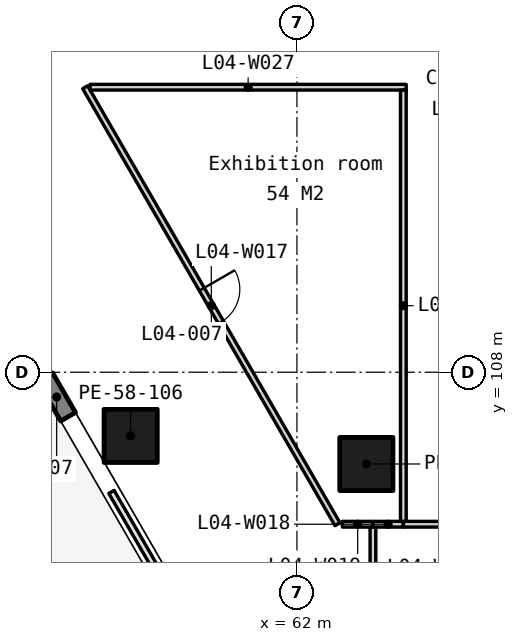
"""IFC4 building model, lengths in metres.
Left out: names, types, materials, properties, quantities, classifications, styles, units other than length and angle.
Written with IfcOpenShell. Run it as: python <this file> out.ifc"""

import sys

from ifc_helpers import new_model, si_unit, direction, frame, frame_2d, origin, origin_2d, place, context, subcontext, project, spatial, rectangle, extrude, element, fill, save


model = new_model("IFC4")
c1 = context("Model", 3, precision=1e-05, world=origin(), true_north=direction((0.0, 1.0)))
c2 = subcontext(c1, "Body", "Model", "MODEL_VIEW")
j1 = project(units=[si_unit("LENGTHUNIT", "METRE"), si_unit("PLANEANGLEUNIT", "RADIAN")], contexts=[c1])
p1 = place(None, origin())
s1 = spatial("IfcSite", under=j1, at=p1, CompositionType="ELEMENT")
p2 = place(p1, origin())
s2 = spatial("IfcBuilding", under=s1, at=p2, CompositionType="ELEMENT")
p3 = place(p2, frame((0.0, 0.0, 25.0)))
s3 = spatial("IfcBuildingStorey", under=s2, at=p3, CompositionType="ELEMENT", Elevation=25.0)
for number, where, z_axis, x_axis in (
    (1, (57.625, 106.325, 0.0), (0.0, 0.0, 1.0), (1.0, 0.0, 0.0)),
    (2, (63.826, 105.585, 0.0), (0.0, 0.0, 1.0), (1.0, 0.0, 0.0)),
):
    element("IfcColumn", number, at=place(p3, frame(where, z_axis=z_axis, x_axis=x_axis)), inside=s3, PredefinedType="COLUMN", context=c2, shape_type="SweptSolid", body=[
        extrude(rectangle(XDim=1.4, YDim=1.4, at=origin_2d()), origin(), (0.0, 0.0, 1.0), 5.0),
    ])
p4 = place(p3, frame((55.378, 107.867, -0.25), z_axis=(0.0, 0.0, 1.0), x_axis=(0.500033551112, -0.866006032174, 0.0)))
e3 = element("IfcWall", 3, at=p4, inside=s3, PredefinedType="SOLIDWALL", context=c2, shape_type="SweptSolid", body=[
    extrude(rectangle(XDim=1.2, YDim=0.45, at=frame_2d((0.6, 0.0))), origin(), (0.0, 0.0, 1.0), 4.262),
])
p5 = place(p3, frame((77.166, 61.679, 0.0), z_axis=(0.0, 0.0, 1.0), x_axis=(-0.500000102728, 0.866025344474, 0.0)))
e4 = element("IfcWall", 4, at=p5, inside=s3, PredefinedType="STANDARD", context=c2, shape_type="SweptSolid", body=[
    extrude(rectangle(XDim=77.841, YDim=1.0, at=frame_2d((38.92, 0.0))), origin(), (0.0, 0.0, 1.0), 0.6),
])
p6 = place(p3, frame((64.0, 101.763, 0.0), z_axis=(0.0, 0.0, 1.0), x_axis=(0.0, 1.0, 0.0)))
e5 = element("IfcWall", 5, at=p6, inside=s3, PredefinedType="PARTITIONING", context=c2, shape_type="SweptSolid", body=[
    extrude(rectangle(XDim=2.162, YDim=0.15, at=frame_2d((1.081, 0.0))), origin(), (0.0, 0.0, 1.0), 4.7),
])
p7 = place(p3, frame((56.427, 115.5, 0.0), z_axis=(0.0, 0.0, 1.0), x_axis=(0.50000679685, -0.866021479586, 0.0)))
e6 = element("IfcWall", 6, at=p7, inside=s3, PredefinedType="PARTITIONING", context=c2, shape_type="SweptSolid", body=[
    extrude(rectangle(XDim=13.279, YDim=0.15, at=frame_2d((6.64, 0.0))), origin(), (0.0, 0.0, 1.0), 4.7),
])
p8 = place(p7, frame((6.14, 0.0, 0.0)))
e7 = element("IfcOpeningElement", 7, at=p8, cuts=e6, PredefinedType="OPENING", context=c2, shape_type="SweptSolid", body=[
    extrude(rectangle(XDim=1.0, YDim=2.1, at=frame_2d((0.5, 1.05))), frame((0.0, 0.085, 0.0), z_axis=(0.0, -1.0, 0.0), x_axis=(1.0, 0.0, 0.0)), (0.0, 0.0, 1.0), 0.17),
])
p9 = place(p3, frame((64.0, 104.0, 0.0), z_axis=(0.0, 0.0, 1.0), x_axis=(1.0, 0.0, 0.0)))
e8 = element("IfcWall", 8, at=p9, inside=s3, PredefinedType="PARTITIONING", context=c2, shape_type="SweptSolid", body=[
    extrude(rectangle(XDim=0.8, YDim=0.15, at=frame_2d((0.4, 0.0))), origin(), (0.0, 0.0, 1.0), 4.7),
])
p10 = place(p3, frame((63.197, 104.0, 0.0), z_axis=(0.0, 0.0, 1.0), x_axis=(1.0, 0.0, 0.0)))
e9 = element("IfcWall", 9, at=p10, inside=s3, PredefinedType="PARTITIONING", context=c2, shape_type="SweptSolid", body=[
    extrude(rectangle(XDim=0.803, YDim=0.15, at=frame_2d((0.402, 0.0))), origin(), (0.0, 0.0, 1.0), 4.7),
])
p11 = place(p3, frame((64.8, 104.0, 0.0), z_axis=(0.0, 0.0, 1.0), x_axis=(1.0, 0.0, 0.0)))
e10 = element("IfcWall", 10, at=p11, inside=s3, PredefinedType="PARTITIONING", context=c2, shape_type="SweptSolid", body=[
    extrude(rectangle(XDim=16.895, YDim=0.15, at=frame_2d((8.448, 0.0))), origin(), (0.0, 0.0, 1.0), 4.7),
])
p12 = place(p11, frame((7.548, 0.0, 0.0)))
e11 = element("IfcOpeningElement", 11, at=p12, cuts=e10, PredefinedType="OPENING", context=c2, shape_type="SweptSolid", body=[
    extrude(rectangle(XDim=1.8, YDim=2.1, at=frame_2d((0.9, 1.05))), frame((0.0, 0.085, 0.0), z_axis=(0.0, -1.0, 0.0), x_axis=(1.0, 0.0, 0.0)), (0.0, 0.0, 1.0), 0.17),
])
p13 = place(p3, frame((56.557, 115.5, 0.0), z_axis=(0.0, 0.0, 1.0), x_axis=(1.0, 0.0, 0.0)))
e12 = element("IfcWall", 12, at=p13, inside=s3, PredefinedType="PARTITIONING", context=c2, shape_type="SweptSolid", body=[
    extrude(rectangle(XDim=8.318, YDim=0.15, at=frame_2d((4.159, 0.0))), origin(), (0.0, 0.0, 1.0), 4.7),
])
p14 = place(p3, frame((64.8, 104.075, 0.0), z_axis=(0.0, 0.0, 1.0), x_axis=(0.0, 1.0, 0.0)))
e13 = element("IfcWall", 13, at=p14, inside=s3, PredefinedType="PARTITIONING", context=c2, shape_type="SweptSolid", body=[
    extrude(rectangle(XDim=11.35, YDim=0.15, at=frame_2d((5.675, 0.0))), origin(), (0.0, 0.0, 1.0), 4.7),
])
p15 = place(p8, origin())
e14 = element("IfcDoor", 14, at=p15, inside=s3, OperationType="SINGLE_SWING_LEFT", PredefinedType="DOOR", context=c2, shape_type="SweptSolid", body=[
    extrude(rectangle(XDim=1.0, YDim=2.1, at=frame_2d((0.5, 1.05))), frame((0.0, 0.025, 0.0), z_axis=(0.0, -1.0, 0.0), x_axis=(1.0, 0.0, 0.0)), (0.0, 0.0, 1.0), 0.05),
])
fill(e7, e14)
save(model, sys.argv[1])
